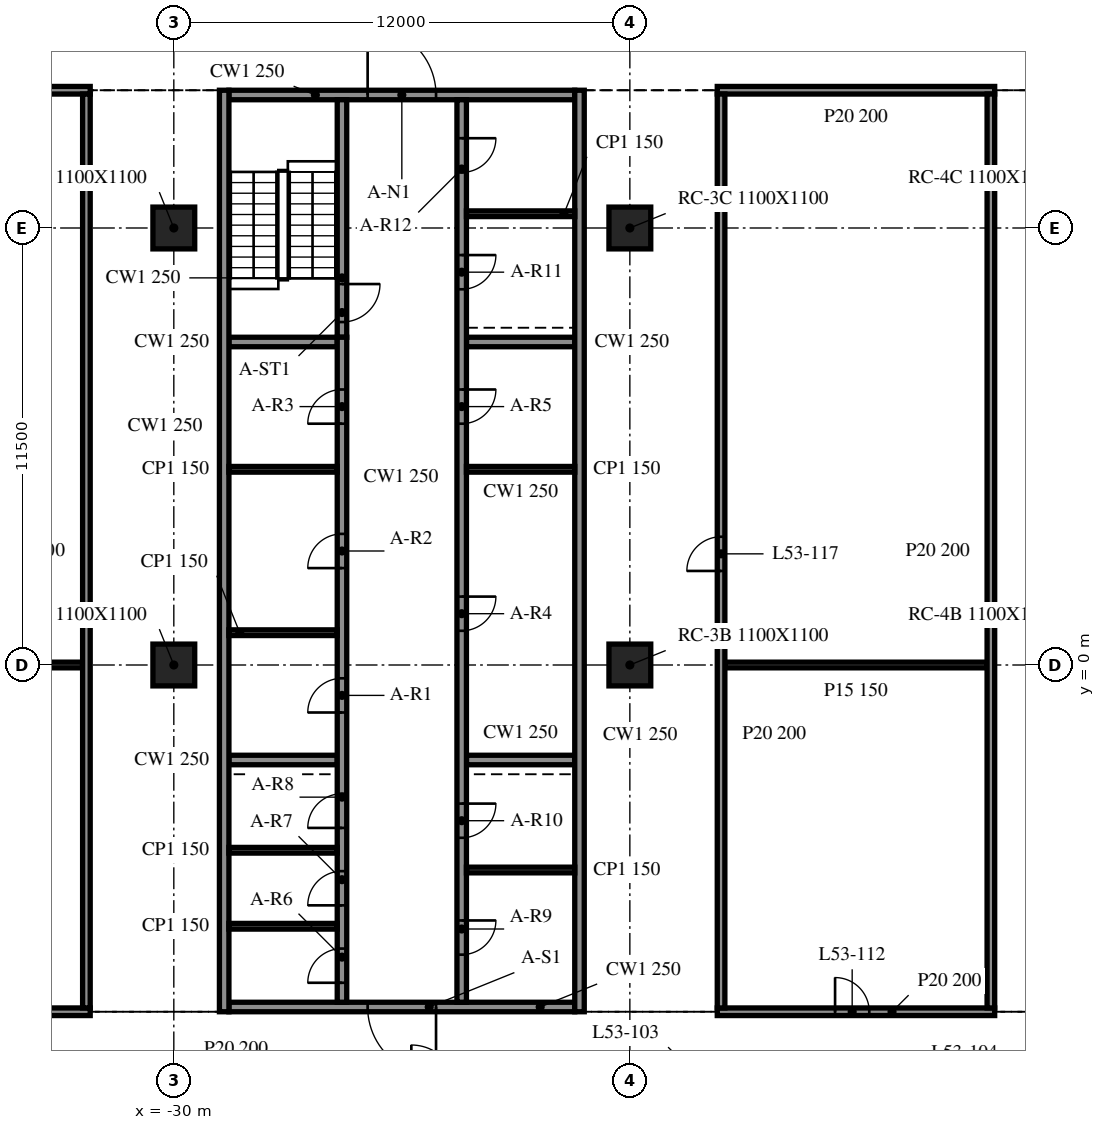
"""IFC4 building model, lengths in metres.
Left out: names, types, materials, properties, quantities, classifications, styles, units other than length and angle.
Written with IfcOpenShell. Run it as: python <this file> out.ifc"""

import sys

from ifc_helpers import new_model, si_unit, direction, frame, frame_2d, origin, origin_2d, place, context, subcontext, project, spatial, rectangle, extrude, element, fill, save


model = new_model("IFC4")
c1 = context("Model", 3, precision=1e-05, world=origin(), true_north=direction((0.0, 1.0)))
c2 = subcontext(c1, "Body", "Model", "MODEL_VIEW")
j1 = project(units=[si_unit("LENGTHUNIT", "METRE"), si_unit("PLANEANGLEUNIT", "RADIAN")], contexts=[c1])
p1 = place(None, origin())
s1 = spatial("IfcSite", under=j1, at=p1, CompositionType="ELEMENT")
p2 = place(p1, origin())
s2 = spatial("IfcBuilding", under=s1, at=p2, CompositionType="ELEMENT")
p3 = place(p2, frame((0.0, 0.0, 220.5)))
s3 = spatial("IfcBuildingStorey", under=s2, at=p3, CompositionType="ELEMENT", Elevation=220.5)
for number, where, z_axis, x_axis in (
    (1, (-30.0, 0.0, -0.34), (0.0, 0.0, 1.0), (1.0, 0.0, 0.0)),
    (2, (-30.0, 11.5, -0.34), (0.0, 0.0, 1.0), (1.0, 0.0, 0.0)),
    (3, (-18.0, 0.0, -0.34), (0.0, 0.0, 1.0), (1.0, 0.0, 0.0)),
    (4, (-18.0, 11.5, -0.34), (0.0, 0.0, 1.0), (1.0, 0.0, 0.0)),
):
    element("IfcColumn", number, at=place(p3, frame(where, z_axis=z_axis, x_axis=x_axis)), inside=s3, PredefinedType="COLUMN", context=c2, shape_type="SweptSolid", body=[
        extrude(rectangle(XDim=1.1, YDim=1.1, at=origin_2d()), origin(), (0.0, 0.0, 1.0), 3.74),
    ])
for number, where, z_axis, x_axis in (
    (5, (-28.675, 15.125, 0.0), (0.0, 0.0, 1.0), (0.0, -1.0, 0.0)),
    (6, (-19.325, -9.125, 0.0), (0.0, 0.0, 1.0), (0.0, 1.0, 0.0)),
):
    element("IfcWall", number, at=place(p3, frame(where, z_axis=z_axis, x_axis=x_axis)), inside=s3, PredefinedType="SOLIDWALL", context=c2, shape_type="SweptSolid", body=[
        extrude(rectangle(XDim=24.25, YDim=0.25, at=frame_2d((12.125, 0.0))), origin(), (0.0, 0.0, 1.0), 3.4),
    ])
p4 = place(p3, frame((-19.45, -9.0, 0.0), z_axis=(0.0, 0.0, 1.0), x_axis=(-1.0, 0.0, 0.0)))
e7 = element("IfcWall", 7, at=p4, inside=s3, PredefinedType="SOLIDWALL", context=c2, shape_type="SweptSolid", body=[
    extrude(rectangle(XDim=9.1, YDim=0.25, at=frame_2d((4.55, 0.0))), origin(), (0.0, 0.0, 1.0), 3.4),
])
p5 = place(p4, frame((3.65, 0.0, 0.0)))
e8 = element("IfcOpeningElement", 8, at=p5, cuts=e7, PredefinedType="OPENING", context=c2, shape_type="SweptSolid", body=[
    extrude(rectangle(XDim=1.8, YDim=2.1, at=frame_2d((0.9, 1.05))), frame((0.0, 0.135, 0.0), z_axis=(0.0, -1.0, 0.0), x_axis=(1.0, 0.0, 0.0)), (0.0, 0.0, 1.0), 0.27),
])
p6 = place(p3, frame((-28.55, 15.0, 0.0), z_axis=(0.0, 0.0, 1.0), x_axis=(1.0, 0.0, 0.0)))
e9 = element("IfcWall", 9, at=p6, inside=s3, PredefinedType="SOLIDWALL", context=c2, shape_type="SweptSolid", body=[
    extrude(rectangle(XDim=9.1, YDim=0.25, at=frame_2d((4.55, 0.0))), origin(), (0.0, 0.0, 1.0), 3.4),
])
p7 = place(p6, frame((3.65, 0.0, 0.0)))
e10 = element("IfcOpeningElement", 10, at=p7, cuts=e9, PredefinedType="OPENING", context=c2, shape_type="SweptSolid", body=[
    extrude(rectangle(XDim=1.8, YDim=2.1, at=frame_2d((0.9, 1.05))), frame((0.0, 0.135, 0.0), z_axis=(0.0, -1.0, 0.0), x_axis=(1.0, 0.0, 0.0)), (0.0, 0.0, 1.0), 0.27),
])
p8 = place(p3, frame((-25.575, -8.875, 0.0), z_axis=(0.0, 0.0, 1.0), x_axis=(0.0, 1.0, 0.0)))
e11 = element("IfcWall", 11, at=p8, inside=s3, PredefinedType="SOLIDWALL", context=c2, shape_type="SweptSolid", body=[
    extrude(rectangle(XDim=17.5, YDim=0.25, at=frame_2d((8.75, 0.0))), origin(), (0.0, 0.0, 1.0), 3.4),
])
p9 = place(p8, frame((7.625, 0.0, 0.0)))
e12 = element("IfcOpeningElement", 12, at=p9, cuts=e11, PredefinedType="OPENING", context=c2, shape_type="SweptSolid", body=[
    extrude(rectangle(XDim=0.9, YDim=2.1, at=frame_2d((0.45, 1.05))), frame((0.0, 0.135, 0.0), z_axis=(0.0, -1.0, 0.0), x_axis=(1.0, 0.0, 0.0)), (0.0, 0.0, 1.0), 0.27),
])
p10 = place(p8, frame((11.425, 0.0, 0.0)))
e13 = element("IfcOpeningElement", 13, at=p10, cuts=e11, PredefinedType="OPENING", context=c2, shape_type="SweptSolid", body=[
    extrude(rectangle(XDim=0.9, YDim=2.1, at=frame_2d((0.45, 1.05))), frame((0.0, 0.135, 0.0), z_axis=(0.0, -1.0, 0.0), x_axis=(1.0, 0.0, 0.0)), (0.0, 0.0, 1.0), 0.27),
])
p11 = place(p8, frame((15.225, 0.0, 0.0)))
e14 = element("IfcOpeningElement", 14, at=p11, cuts=e11, PredefinedType="OPENING", context=c2, shape_type="SweptSolid", body=[
    extrude(rectangle(XDim=0.9, YDim=2.1, at=frame_2d((0.45, 1.05))), frame((0.0, 0.135, 0.0), z_axis=(0.0, -1.0, 0.0), x_axis=(1.0, 0.0, 0.0)), (0.0, 0.0, 1.0), 0.27),
])
p12 = place(p8, frame((0.512, 0.0, 0.0)))
e15 = element("IfcOpeningElement", 15, at=p12, cuts=e11, PredefinedType="OPENING", context=c2, shape_type="SweptSolid", body=[
    extrude(rectangle(XDim=0.9, YDim=2.1, at=frame_2d((0.45, 1.05))), frame((0.0, 0.135, 0.0), z_axis=(0.0, -1.0, 0.0), x_axis=(1.0, 0.0, 0.0)), (0.0, 0.0, 1.0), 0.27),
])
p13 = place(p8, frame((2.55, 0.0, 0.0)))
e16 = element("IfcOpeningElement", 16, at=p13, cuts=e11, PredefinedType="OPENING", context=c2, shape_type="SweptSolid", body=[
    extrude(rectangle(XDim=0.9, YDim=2.1, at=frame_2d((0.45, 1.05))), frame((0.0, 0.135, 0.0), z_axis=(0.0, -1.0, 0.0), x_axis=(1.0, 0.0, 0.0)), (0.0, 0.0, 1.0), 0.27),
])
p14 = place(p8, frame((4.587, 0.0, 0.0)))
e17 = element("IfcOpeningElement", 17, at=p14, cuts=e11, PredefinedType="OPENING", context=c2, shape_type="SweptSolid", body=[
    extrude(rectangle(XDim=0.9, YDim=2.1, at=frame_2d((0.45, 1.05))), frame((0.0, 0.135, 0.0), z_axis=(0.0, -1.0, 0.0), x_axis=(1.0, 0.0, 0.0)), (0.0, 0.0, 1.0), 0.27),
])
p15 = place(p3, frame((-25.575, 14.875, 0.0), z_axis=(0.0, 0.0, 1.0), x_axis=(0.0, -1.0, 0.0)))
e18 = element("IfcWall", 18, at=p15, inside=s3, PredefinedType="SOLIDWALL", context=c2, shape_type="SweptSolid", body=[
    extrude(rectangle(XDim=6.25, YDim=0.25, at=frame_2d((3.125, 0.0))), origin(), (0.0, 0.0, 1.0), 3.4),
])
p16 = place(p15, frame((4.85, 0.0, 0.0)))
e19 = element("IfcOpeningElement", 19, at=p16, cuts=e18, PredefinedType="OPENING", context=c2, shape_type="SweptSolid", body=[
    extrude(rectangle(XDim=1.0, YDim=2.1, at=frame_2d((0.5, 1.05))), frame((0.0, 0.135, 0.0), z_axis=(0.0, -1.0, 0.0), x_axis=(1.0, 0.0, 0.0)), (0.0, 0.0, 1.0), 0.27),
])
p17 = place(p3, frame((-22.425, 14.875, 0.0), z_axis=(0.0, 0.0, 1.0), x_axis=(0.0, -1.0, 0.0)))
e20 = element("IfcWall", 20, at=p17, inside=s3, PredefinedType="SOLIDWALL", context=c2, shape_type="SweptSolid", body=[
    extrude(rectangle(XDim=23.75, YDim=0.25, at=frame_2d((11.875, 0.0))), origin(), (0.0, 0.0, 1.0), 3.4),
])
p18 = place(p17, frame((13.075, 0.0, 0.0)))
e21 = element("IfcOpeningElement", 21, at=p18, cuts=e20, PredefinedType="OPENING", context=c2, shape_type="SweptSolid", body=[
    extrude(rectangle(XDim=0.9, YDim=2.1, at=frame_2d((0.45, 1.05))), frame((0.0, 0.135, 0.0), z_axis=(0.0, -1.0, 0.0), x_axis=(1.0, 0.0, 0.0)), (0.0, 0.0, 1.0), 0.27),
])
p19 = place(p17, frame((7.625, 0.0, 0.0)))
e22 = element("IfcOpeningElement", 22, at=p19, cuts=e20, PredefinedType="OPENING", context=c2, shape_type="SweptSolid", body=[
    extrude(rectangle(XDim=0.9, YDim=2.1, at=frame_2d((0.45, 1.05))), frame((0.0, 0.135, 0.0), z_axis=(0.0, -1.0, 0.0), x_axis=(1.0, 0.0, 0.0)), (0.0, 0.0, 1.0), 0.27),
])
p20 = place(p17, frame((21.597, 0.0, 0.0)))
e23 = element("IfcOpeningElement", 23, at=p20, cuts=e20, PredefinedType="OPENING", context=c2, shape_type="SweptSolid", body=[
    extrude(rectangle(XDim=0.9, YDim=2.1, at=frame_2d((0.45, 1.05))), frame((0.0, 0.135, 0.0), z_axis=(0.0, -1.0, 0.0), x_axis=(1.0, 0.0, 0.0)), (0.0, 0.0, 1.0), 0.27),
])
p21 = place(p17, frame((18.522, 0.0, 0.0)))
e24 = element("IfcOpeningElement", 24, at=p21, cuts=e20, PredefinedType="OPENING", context=c2, shape_type="SweptSolid", body=[
    extrude(rectangle(XDim=0.9, YDim=2.1, at=frame_2d((0.45, 1.05))), frame((0.0, 0.135, 0.0), z_axis=(0.0, -1.0, 0.0), x_axis=(1.0, 0.0, 0.0)), (0.0, 0.0, 1.0), 0.27),
])
p22 = place(p17, frame((4.087, 0.0, 0.0)))
e25 = element("IfcOpeningElement", 25, at=p22, cuts=e20, PredefinedType="OPENING", context=c2, shape_type="SweptSolid", body=[
    extrude(rectangle(XDim=0.9, YDim=2.1, at=frame_2d((0.45, 1.05))), frame((0.0, 0.135, 0.0), z_axis=(0.0, -1.0, 0.0), x_axis=(1.0, 0.0, 0.0)), (0.0, 0.0, 1.0), 0.27),
])
p23 = place(p17, frame((1.012, 0.0, 0.0)))
e26 = element("IfcOpeningElement", 26, at=p23, cuts=e20, PredefinedType="OPENING", context=c2, shape_type="SweptSolid", body=[
    extrude(rectangle(XDim=0.9, YDim=2.1, at=frame_2d((0.45, 1.05))), frame((0.0, 0.135, 0.0), z_axis=(0.0, -1.0, 0.0), x_axis=(1.0, 0.0, 0.0)), (0.0, 0.0, 1.0), 0.27),
])
for number, where, z_axis, x_axis in (
    (27, (-28.55, -2.5, 0.0), (0.0, 0.0, 1.0), (1.0, 0.0, 0.0)),
    (28, (-28.55, 8.5, 0.0), (0.0, 0.0, 1.0), (1.0, 0.0, 0.0)),
    (29, (-22.3, -2.5, 0.0), (0.0, 0.0, 1.0), (1.0, 0.0, 0.0)),
    (30, (-22.3, 8.5, 0.0), (0.0, 0.0, 1.0), (1.0, 0.0, 0.0)),
):
    element("IfcWall", number, at=place(p3, frame(where, z_axis=z_axis, x_axis=x_axis)), inside=s3, PredefinedType="SOLIDWALL", context=c2, shape_type="SweptSolid", body=[
        extrude(rectangle(XDim=2.85, YDim=0.25, at=frame_2d((1.425, 0.0))), origin(), (0.0, 0.0, 1.0), 3.4),
    ])
for number, where, z_axis, x_axis in (
    (31, (-28.55, 0.85, 0.0), (0.0, 0.0, 1.0), (1.0, 0.0, 0.0)),
    (32, (-28.55, 5.15, 0.0), (0.0, 0.0, 1.0), (1.0, 0.0, 0.0)),
    (33, (-22.3, 5.15, 0.0), (0.0, 0.0, 1.0), (1.0, 0.0, 0.0)),
    (34, (-28.55, -6.875, 0.0), (0.0, 0.0, 1.0), (1.0, 0.0, 0.0)),
    (35, (-28.55, -4.875, 0.0), (0.0, 0.0, 1.0), (1.0, 0.0, 0.0)),
    (36, (-22.3, -5.395, 0.0), (0.0, 0.0, 1.0), (1.0, 0.0, 0.0)),
    (37, (-22.3, 11.875, 0.0), (0.0, 0.0, 1.0), (1.0, 0.0, 0.0)),
):
    element("IfcWall", number, at=place(p3, frame(where, z_axis=z_axis, x_axis=x_axis)), inside=s3, PredefinedType="PARTITIONING", context=c2, shape_type="SweptSolid", body=[
        extrude(rectangle(XDim=2.85, YDim=0.15, at=frame_2d((1.425, 0.0))), origin(), (0.0, 0.0, 1.0), 3.4),
    ])
p24 = place(p3, frame((-41.975, -9.125, 0.0), z_axis=(0.0, 0.0, 1.0), x_axis=(1.0, 0.0, 0.0)))
e38 = element("IfcWall", 38, at=p24, inside=s3, PredefinedType="PARTITIONING", context=c2, shape_type="SweptSolid", body=[
    extrude(rectangle(XDim=9.775, YDim=0.2, at=frame_2d((4.888, 0.0))), origin(), (0.0, 0.0, 1.0), 3.4),
])
p25 = place(p24, frame((4.3, 0.0, 0.0)))
e39 = element("IfcOpeningElement", 39, at=p25, cuts=e38, PredefinedType="OPENING", context=c2, shape_type="SweptSolid", body=[
    extrude(rectangle(XDim=1.2, YDim=2.1, at=frame_2d((0.6, 1.05))), frame((0.0, 0.11, 0.0), z_axis=(0.0, -1.0, 0.0), x_axis=(1.0, 0.0, 0.0)), (0.0, 0.0, 1.0), 0.22),
])
p26 = place(p3, frame((-15.7, -9.125, 0.0), z_axis=(0.0, 0.0, 1.0), x_axis=(1.0, 0.0, 0.0)))
e40 = element("IfcWall", 40, at=p26, inside=s3, PredefinedType="PARTITIONING", context=c2, shape_type="SweptSolid", body=[
    extrude(rectangle(XDim=7.3, YDim=0.2, at=frame_2d((3.65, 0.0))), origin(), (0.0, 0.0, 1.0), 3.4),
])
p27 = place(p26, frame((3.1, 0.0, 0.0)))
e41 = element("IfcOpeningElement", 41, at=p27, cuts=e40, PredefinedType="OPENING", context=c2, shape_type="SweptSolid", body=[
    extrude(rectangle(XDim=0.9, YDim=2.1, at=frame_2d((0.45, 1.05))), frame((0.0, 0.11, 0.0), z_axis=(0.0, -1.0, 0.0), x_axis=(1.0, 0.0, 0.0)), (0.0, 0.0, 1.0), 0.22),
])
p28 = place(p3, frame((-41.45, 0.0, 0.0), z_axis=(0.0, 0.0, 1.0), x_axis=(1.0, 0.0, 0.0)))
e42 = element("IfcWall", 42, at=p28, inside=s3, PredefinedType="PARTITIONING", context=c2, shape_type="SweptSolid", body=[
    extrude(rectangle(XDim=9.05, YDim=0.15, at=frame_2d((4.525, 0.0))), origin(), (0.0, 0.0, 1.0), 3.4),
])
p29 = place(p3, frame((-15.5, 0.0, 0.0), z_axis=(0.0, 0.0, 1.0), x_axis=(1.0, 0.0, 0.0)))
e43 = element("IfcWall", 43, at=p29, inside=s3, PredefinedType="PARTITIONING", context=c2, shape_type="SweptSolid", body=[
    extrude(rectangle(XDim=6.9, YDim=0.15, at=frame_2d((3.45, 0.0))), origin(), (0.0, 0.0, 1.0), 3.4),
])
p30 = place(p3, frame((-41.975, 15.125, 0.0), z_axis=(0.0, 0.0, 1.0), x_axis=(1.0, 0.0, 0.0)))
e44 = element("IfcWall", 44, at=p30, inside=s3, PredefinedType="PARTITIONING", context=c2, shape_type="SweptSolid", body=[
    extrude(rectangle(XDim=9.775, YDim=0.2, at=frame_2d((4.888, 0.0))), origin(), (0.0, 0.0, 1.0), 3.4),
])
p31 = place(p30, frame((4.3, 0.0, 0.0)))
e45 = element("IfcOpeningElement", 45, at=p31, cuts=e44, PredefinedType="OPENING", context=c2, shape_type="SweptSolid", body=[
    extrude(rectangle(XDim=1.0, YDim=2.1, at=frame_2d((0.5, 1.05))), frame((0.0, 0.11, 0.0), z_axis=(0.0, -1.0, 0.0), x_axis=(1.0, 0.0, 0.0)), (0.0, 0.0, 1.0), 0.22),
])
p32 = place(p3, frame((-15.7, 15.125, 0.0), z_axis=(0.0, 0.0, 1.0), x_axis=(1.0, 0.0, 0.0)))
e46 = element("IfcWall", 46, at=p32, inside=s3, PredefinedType="PARTITIONING", context=c2, shape_type="SweptSolid", body=[
    extrude(rectangle(XDim=7.3, YDim=0.2, at=frame_2d((3.65, 0.0))), origin(), (0.0, 0.0, 1.0), 3.4),
])
p33 = place(p3, frame((-32.3, -9.025, 0.0), z_axis=(0.0, 0.0, 1.0), x_axis=(0.0, 1.0, 0.0)))
e47 = element("IfcWall", 47, at=p33, inside=s3, PredefinedType="PARTITIONING", context=c2, shape_type="SweptSolid", body=[
    extrude(rectangle(XDim=24.05, YDim=0.2, at=frame_2d((12.025, 0.0))), origin(), (0.0, 0.0, 1.0), 3.4),
])
p34 = place(p3, frame((-15.6, -9.025, 0.0), z_axis=(0.0, 0.0, 1.0), x_axis=(0.0, 1.0, 0.0)))
e48 = element("IfcWall", 48, at=p34, inside=s3, PredefinedType="PARTITIONING", context=c2, shape_type="SweptSolid", body=[
    extrude(rectangle(XDim=24.05, YDim=0.2, at=frame_2d((12.025, 0.0))), origin(), (0.0, 0.0, 1.0), 3.4),
])
p35 = place(p34, frame((11.5, 0.0, 0.0)))
e49 = element("IfcOpeningElement", 49, at=p35, cuts=e48, PredefinedType="OPENING", context=c2, shape_type="SweptSolid", body=[
    extrude(rectangle(XDim=0.9, YDim=2.1, at=frame_2d((0.45, 1.05))), frame((0.0, 0.11, 0.0), z_axis=(0.0, -1.0, 0.0), x_axis=(1.0, 0.0, 0.0)), (0.0, 0.0, 1.0), 0.22),
])
p36 = place(p3, frame((-8.5, -9.025, 0.0), z_axis=(0.0, 0.0, 1.0), x_axis=(0.0, 1.0, 0.0)))
e50 = element("IfcWall", 50, at=p36, inside=s3, PredefinedType="PARTITIONING", context=c2, shape_type="SweptSolid", body=[
    extrude(rectangle(XDim=24.05, YDim=0.2, at=frame_2d((12.025, 0.0))), origin(), (0.0, 0.0, 1.0), 3.4),
])
p37 = place(p5, origin())
e51 = element("IfcDoor", 51, at=p37, inside=s3, OperationType="DOUBLE_DOOR_SINGLE_SWING", PredefinedType="DOOR", context=c2, shape_type="SweptSolid", body=[
    extrude(rectangle(XDim=1.8, YDim=2.1, at=frame_2d((0.9, 1.05))), frame((0.0, 0.025, 0.0), z_axis=(0.0, -1.0, 0.0), x_axis=(1.0, 0.0, 0.0)), (0.0, 0.0, 1.0), 0.05),
])
fill(e8, e51)
p38 = place(p7, origin())
e52 = element("IfcDoor", 52, at=p38, inside=s3, OperationType="DOUBLE_DOOR_SINGLE_SWING", PredefinedType="DOOR", context=c2, shape_type="SweptSolid", body=[
    extrude(rectangle(XDim=1.8, YDim=2.1, at=frame_2d((0.9, 1.05))), frame((0.0, 0.025, 0.0), z_axis=(0.0, -1.0, 0.0), x_axis=(1.0, 0.0, 0.0)), (0.0, 0.0, 1.0), 0.05),
])
fill(e10, e52)
p39 = place(p9, origin())
e53 = element("IfcDoor", 53, at=p39, inside=s3, OperationType="SINGLE_SWING_LEFT", PredefinedType="DOOR", context=c2, shape_type="SweptSolid", body=[
    extrude(rectangle(XDim=0.9, YDim=2.1, at=frame_2d((0.45, 1.05))), frame((0.0, 0.025, 0.0), z_axis=(0.0, -1.0, 0.0), x_axis=(1.0, 0.0, 0.0)), (0.0, 0.0, 1.0), 0.05),
])
fill(e12, e53)
p40 = place(p10, origin())
e54 = element("IfcDoor", 54, at=p40, inside=s3, OperationType="SINGLE_SWING_RIGHT", PredefinedType="DOOR", context=c2, shape_type="SweptSolid", body=[
    extrude(rectangle(XDim=0.9, YDim=2.1, at=frame_2d((0.45, 1.05))), frame((0.0, 0.025, 0.0), z_axis=(0.0, -1.0, 0.0), x_axis=(1.0, 0.0, 0.0)), (0.0, 0.0, 1.0), 0.05),
])
fill(e13, e54)
p41 = place(p11, origin())
e55 = element("IfcDoor", 55, at=p41, inside=s3, OperationType="SINGLE_SWING_LEFT", PredefinedType="DOOR", context=c2, shape_type="SweptSolid", body=[
    extrude(rectangle(XDim=0.9, YDim=2.1, at=frame_2d((0.45, 1.05))), frame((0.0, 0.025, 0.0), z_axis=(0.0, -1.0, 0.0), x_axis=(1.0, 0.0, 0.0)), (0.0, 0.0, 1.0), 0.05),
])
fill(e14, e55)
p42 = place(p18, origin())
e56 = element("IfcDoor", 56, at=p42, inside=s3, OperationType="SINGLE_SWING_RIGHT", PredefinedType="DOOR", context=c2, shape_type="SweptSolid", body=[
    extrude(rectangle(XDim=0.9, YDim=2.1, at=frame_2d((0.45, 1.05))), frame((0.0, 0.025, 0.0), z_axis=(0.0, -1.0, 0.0), x_axis=(1.0, 0.0, 0.0)), (0.0, 0.0, 1.0), 0.05),
])
fill(e21, e56)
p43 = place(p19, origin())
e57 = element("IfcDoor", 57, at=p43, inside=s3, OperationType="SINGLE_SWING_LEFT", PredefinedType="DOOR", context=c2, shape_type="SweptSolid", body=[
    extrude(rectangle(XDim=0.9, YDim=2.1, at=frame_2d((0.45, 1.05))), frame((0.0, 0.025, 0.0), z_axis=(0.0, -1.0, 0.0), x_axis=(1.0, 0.0, 0.0)), (0.0, 0.0, 1.0), 0.05),
])
fill(e22, e57)
p44 = place(p12, origin())
e58 = element("IfcDoor", 58, at=p44, inside=s3, OperationType="SINGLE_SWING_RIGHT", PredefinedType="DOOR", context=c2, shape_type="SweptSolid", body=[
    extrude(rectangle(XDim=0.9, YDim=2.1, at=frame_2d((0.45, 1.05))), frame((0.0, 0.025, 0.0), z_axis=(0.0, -1.0, 0.0), x_axis=(1.0, 0.0, 0.0)), (0.0, 0.0, 1.0), 0.05),
])
fill(e15, e58)
p45 = place(p13, origin())
e59 = element("IfcDoor", 59, at=p45, inside=s3, OperationType="SINGLE_SWING_LEFT", PredefinedType="DOOR", context=c2, shape_type="SweptSolid", body=[
    extrude(rectangle(XDim=0.9, YDim=2.1, at=frame_2d((0.45, 1.05))), frame((0.0, 0.025, 0.0), z_axis=(0.0, -1.0, 0.0), x_axis=(1.0, 0.0, 0.0)), (0.0, 0.0, 1.0), 0.05),
])
fill(e16, e59)
p46 = place(p14, origin())
e60 = element("IfcDoor", 60, at=p46, inside=s3, OperationType="SINGLE_SWING_RIGHT", PredefinedType="DOOR", context=c2, shape_type="SweptSolid", body=[
    extrude(rectangle(XDim=0.9, YDim=2.1, at=frame_2d((0.45, 1.05))), frame((0.0, 0.025, 0.0), z_axis=(0.0, -1.0, 0.0), x_axis=(1.0, 0.0, 0.0)), (0.0, 0.0, 1.0), 0.05),
])
fill(e17, e60)
p47 = place(p20, origin())
e61 = element("IfcDoor", 61, at=p47, inside=s3, OperationType="SINGLE_SWING_LEFT", PredefinedType="DOOR", context=c2, shape_type="SweptSolid", body=[
    extrude(rectangle(XDim=0.9, YDim=2.1, at=frame_2d((0.45, 1.05))), frame((0.0, 0.025, 0.0), z_axis=(0.0, -1.0, 0.0), x_axis=(1.0, 0.0, 0.0)), (0.0, 0.0, 1.0), 0.05),
])
fill(e23, e61)
p48 = place(p21, origin())
e62 = element("IfcDoor", 62, at=p48, inside=s3, OperationType="SINGLE_SWING_RIGHT", PredefinedType="DOOR", context=c2, shape_type="SweptSolid", body=[
    extrude(rectangle(XDim=0.9, YDim=2.1, at=frame_2d((0.45, 1.05))), frame((0.0, 0.025, 0.0), z_axis=(0.0, -1.0, 0.0), x_axis=(1.0, 0.0, 0.0)), (0.0, 0.0, 1.0), 0.05),
])
fill(e24, e62)
p49 = place(p22, origin())
e63 = element("IfcDoor", 63, at=p49, inside=s3, OperationType="SINGLE_SWING_LEFT", PredefinedType="DOOR", context=c2, shape_type="SweptSolid", body=[
    extrude(rectangle(XDim=0.9, YDim=2.1, at=frame_2d((0.45, 1.05))), frame((0.0, 0.025, 0.0), z_axis=(0.0, -1.0, 0.0), x_axis=(1.0, 0.0, 0.0)), (0.0, 0.0, 1.0), 0.05),
])
fill(e25, e63)
p50 = place(p23, origin())
e64 = element("IfcDoor", 64, at=p50, inside=s3, OperationType="SINGLE_SWING_RIGHT", PredefinedType="DOOR", context=c2, shape_type="SweptSolid", body=[
    extrude(rectangle(XDim=0.9, YDim=2.1, at=frame_2d((0.45, 1.05))), frame((0.0, 0.025, 0.0), z_axis=(0.0, -1.0, 0.0), x_axis=(1.0, 0.0, 0.0)), (0.0, 0.0, 1.0), 0.05),
])
fill(e26, e64)
p51 = place(p16, origin())
e65 = element("IfcDoor", 65, at=p51, inside=s3, OperationType="SINGLE_SWING_LEFT", PredefinedType="DOOR", context=c2, shape_type="SweptSolid", body=[
    extrude(rectangle(XDim=1.0, YDim=2.1, at=frame_2d((0.5, 1.05))), frame((0.0, 0.025, 0.0), z_axis=(0.0, -1.0, 0.0), x_axis=(1.0, 0.0, 0.0)), (0.0, 0.0, 1.0), 0.05),
])
fill(e19, e65)
p52 = place(p27, origin())
e66 = element("IfcDoor", 66, at=p52, inside=s3, OperationType="SINGLE_SWING_LEFT", PredefinedType="DOOR", context=c2, shape_type="SweptSolid", body=[
    extrude(rectangle(XDim=0.9, YDim=2.1, at=frame_2d((0.45, 1.05))), frame((0.0, 0.025, 0.0), z_axis=(0.0, -1.0, 0.0), x_axis=(1.0, 0.0, 0.0)), (0.0, 0.0, 1.0), 0.05),
])
fill(e41, e66)
p53 = place(p35, origin())
e67 = element("IfcDoor", 67, at=p53, inside=s3, OperationType="SINGLE_SWING_RIGHT", PredefinedType="DOOR", context=c2, shape_type="SweptSolid", body=[
    extrude(rectangle(XDim=0.9, YDim=2.1, at=frame_2d((0.45, 1.05))), frame((0.0, 0.025, 0.0), z_axis=(0.0, -1.0, 0.0), x_axis=(1.0, 0.0, 0.0)), (0.0, 0.0, 1.0), 0.05),
])
fill(e49, e67)
save(model, sys.argv[1])
